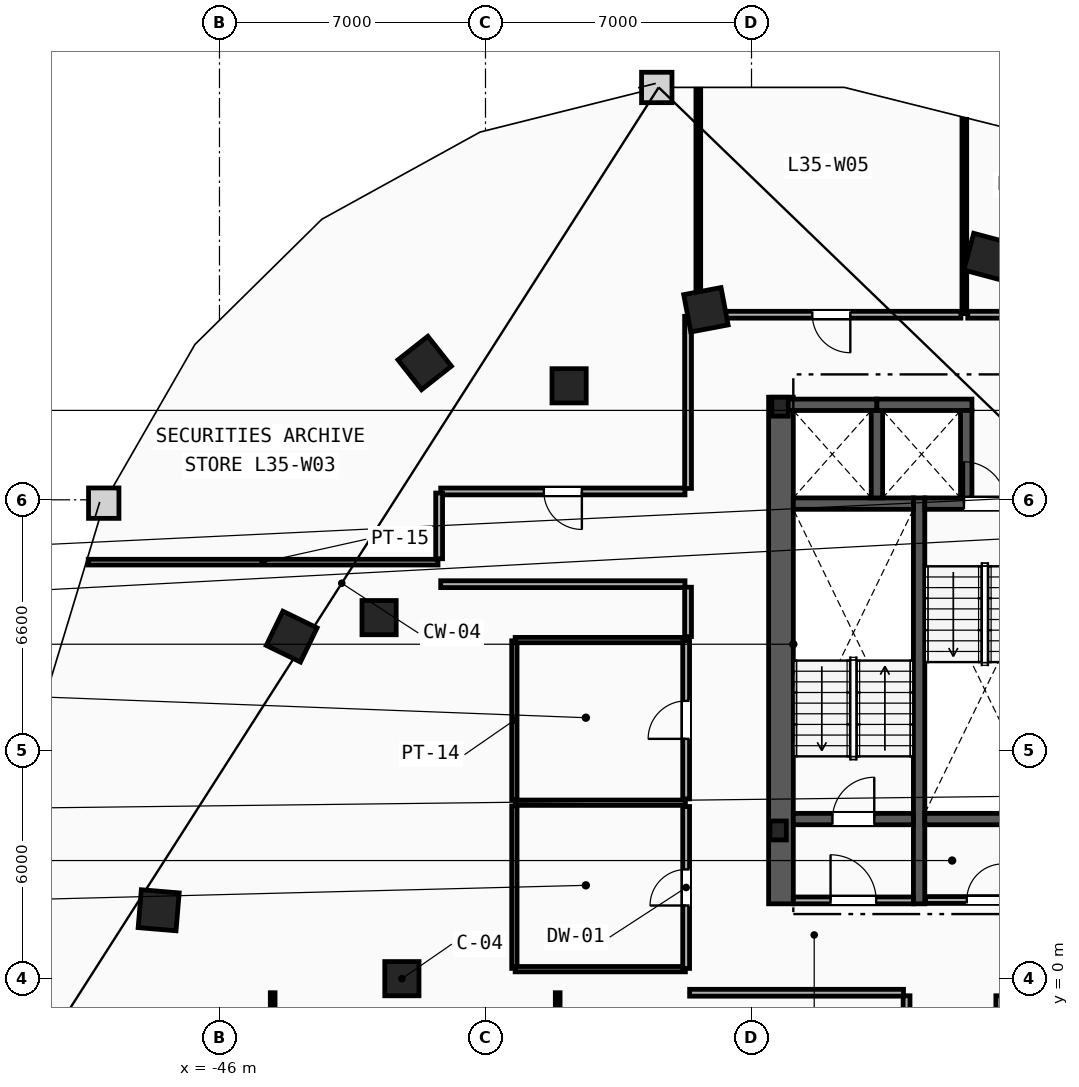
"""IFC4 building model, lengths in metres.
Left out: names, types, materials, properties, quantities, classifications, styles, units other than length and angle.
Written with IfcOpenShell. Run it as: python <this file> out.ifc"""

import sys

from ifc_helpers import new_model, si_unit, direction, frame, frame_2d, origin, origin_2d, place, context, subcontext, project, spatial, rectangle, i_section, extrude, element, fill, save


model = new_model("IFC4")
c1 = context("Model", 3, precision=1e-05, world=origin(), true_north=direction((0.0, 1.0)))
c2 = subcontext(c1, "Body", "Model", "MODEL_VIEW")
j1 = project(units=[si_unit("LENGTHUNIT", "METRE"), si_unit("PLANEANGLEUNIT", "RADIAN")], contexts=[c1])
p1 = place(None, origin())
s1 = spatial("IfcSite", under=j1, at=p1, CompositionType="ELEMENT")
p2 = place(p1, origin())
s2 = spatial("IfcBuilding", under=s1, at=p2, CompositionType="ELEMENT")
p3 = place(p2, frame((0.0, 0.0, 136.8)))
s3 = spatial("IfcBuildingStorey", under=s2, at=p3, CompositionType="ELEMENT", Elevation=136.8)
for number, where, z_axis, x_axis in (
    (1, (-31.3, 3.9, 0.0), (0.0, 0.0, 1.0), (1.0, 0.0, 0.0)),
    (2, (-31.25, 15.05, 0.0), (0.0, 0.0, 1.0), (1.0, 0.0, 0.0)),
):
    element("IfcColumn", number, at=place(p3, frame(where, z_axis=z_axis, x_axis=x_axis)), inside=s3, PredefinedType="COLUMN", context=c2, shape_type="SweptSolid", body=[
        extrude(i_section(OverallWidth=0.432, OverallDepth=0.498, WebThickness=0.056, FlangeThickness=0.089, FilletRadius=0.018, at=origin_2d()), origin(), (0.0, 0.0, 1.0), 3.6),
    ])
for number, where, z_axis, x_axis in (
    (3, (-41.2, 0.0, 0.0), (0.0, 0.0, 1.0), (1.0, 0.0, 0.0)),
    (4, (-41.8, 9.5, 0.0), (0.0, 0.0, 1.0), (1.0, 0.0, 0.0)),
    (5, (-36.8, 15.6, 0.0), (0.0, 0.0, 1.0), (1.0, 0.0, 0.0)),
):
    element("IfcColumn", number, at=place(p3, frame(where, z_axis=z_axis, x_axis=x_axis)), inside=s3, PredefinedType="COLUMN", context=c2, shape_type="SweptSolid", body=[
        extrude(rectangle(XDim=0.9, YDim=0.9, at=origin_2d()), origin(), (0.0, 0.0, 1.0), 3.6),
    ])
for number, where, z_axis, x_axis in (
    (6, (-25.8, 19.0, 0.0), (0.0, 0.0, 1.0), (-0.966, 0.259, 0.0)),
    (7, (-33.2, 17.6, 0.0), (0.0, 0.0, 1.0), (-0.983, -0.186, 0.0)),
    (8, (-40.6, 16.2, 0.0), (0.0, 0.0, 1.0), (-0.785, -0.619, 0.0)),
    (9, (-44.1, 9.0, 0.0), (0.0, 0.0, 1.0), (-0.437, -0.899, 0.0)),
    (10, (-47.6, 1.8, 0.0), (0.0, 0.0, 1.0), (-0.084, -0.997, 0.0)),
):
    element("IfcColumn", number, at=place(p3, frame(where, z_axis=z_axis, x_axis=x_axis)), inside=s3, PredefinedType="COLUMN", context=c2, shape_type="SweptSolid", body=[
        extrude(rectangle(XDim=1.0, YDim=1.0, at=origin_2d()), origin(), (0.0, 0.0, 1.0), 3.6),
    ])
p4 = place(p3, frame((-31.225, 1.97, 0.0), z_axis=(0.0, 0.0, 1.0), x_axis=(0.0, 1.0, 0.0)))
e11 = element("IfcWall", 11, at=p4, inside=s3, PredefinedType="SHEAR", context=c2, shape_type="SweptSolid", body=[
    extrude(rectangle(XDim=13.33, YDim=0.65, at=frame_2d((6.665, 0.0))), origin(), (0.0, 0.0, 1.0), 3.36),
])
p5 = place(p3, frame((-27.59, 1.97, 0.0), z_axis=(0.0, 0.0, 1.0), x_axis=(0.0, 1.0, 0.0)))
e12 = element("IfcWall", 12, at=p5, inside=s3, PredefinedType="SHEAR", context=c2, shape_type="SweptSolid", body=[
    extrude(rectangle(XDim=10.68, YDim=0.3, at=frame_2d((5.34, 0.0))), origin(), (0.0, 0.0, 1.0), 3.36),
])
p6 = place(p3, frame((-30.9, 4.2, 0.0), z_axis=(0.0, 0.0, 1.0), x_axis=(1.0, 0.0, 0.0)))
e13 = element("IfcWall", 13, at=p6, inside=s3, PredefinedType="SHEAR", context=c2, shape_type="SweptSolid", body=[
    extrude(rectangle(XDim=3.16, YDim=0.3, at=frame_2d((1.58, 0.0))), origin(), (0.0, 0.0, 1.0), 3.36),
])
p7 = place(p6, frame((1.03, 0.0, 0.0)))
e14 = element("IfcOpeningElement", 14, at=p7, cuts=e13, PredefinedType="OPENING", context=c2, shape_type="SweptSolid", body=[
    extrude(rectangle(XDim=1.1, YDim=2.15, at=frame_2d((0.55, 1.075))), frame((0.0, 0.16, 0.0), z_axis=(0.0, -1.0, 0.0), x_axis=(1.0, 0.0, 0.0)), (0.0, 0.0, 1.0), 0.32),
])
p8 = place(p3, frame((-30.9, 12.5, 0.0), z_axis=(0.0, 0.0, 1.0), x_axis=(1.0, 0.0, 0.0)))
e15 = element("IfcWall", 15, at=p8, inside=s3, PredefinedType="SHEAR", context=c2, shape_type="SweptSolid", body=[
    extrude(rectangle(XDim=3.16, YDim=0.3, at=frame_2d((1.58, 0.0))), origin(), (0.0, 0.0, 1.0), 3.36),
])
p9 = place(p3, frame((-27.44, 12.5, 0.0), z_axis=(0.0, 0.0, 1.0), x_axis=(1.0, 0.0, 0.0)))
e16 = element("IfcWall", 16, at=p9, inside=s3, PredefinedType="SHEAR", context=c2, shape_type="SweptSolid", body=[
    extrude(rectangle(XDim=3.16, YDim=0.3, at=frame_2d((1.58, 0.0))), origin(), (0.0, 0.0, 1.0), 3.36),
])
p10 = place(p9, frame((1.03, 0.0, 0.0)))
e17 = element("IfcOpeningElement", 17, at=p10, cuts=e16, PredefinedType="OPENING", context=c2, shape_type="SweptSolid", body=[
    extrude(rectangle(XDim=1.1, YDim=2.15, at=frame_2d((0.55, 1.075))), frame((0.0, 0.16, 0.0), z_axis=(0.0, -1.0, 0.0), x_axis=(1.0, 0.0, 0.0)), (0.0, 0.0, 1.0), 0.32),
])
p11 = place(p3, frame((-27.44, 4.2, 0.0), z_axis=(0.0, 0.0, 1.0), x_axis=(1.0, 0.0, 0.0)))
e18 = element("IfcWall", 18, at=p11, inside=s3, PredefinedType="SHEAR", context=c2, shape_type="SweptSolid", body=[
    extrude(rectangle(XDim=3.16, YDim=0.3, at=frame_2d((1.58, 0.0))), origin(), (0.0, 0.0, 1.0), 3.36),
])
p12 = place(p3, frame((-30.9, 2.06, 0.0), z_axis=(0.0, 0.0, 1.0), x_axis=(1.0, 0.0, 0.0)))
e19 = element("IfcWall", 19, at=p12, inside=s3, PredefinedType="PARTITIONING", context=c2, shape_type="SweptSolid", body=[
    extrude(rectangle(XDim=3.16, YDim=0.18, at=frame_2d((1.58, 0.0))), origin(), (0.0, 0.0, 1.0), 3.36),
])
p13 = place(p12, frame((0.98, 0.0, 0.0)))
e20 = element("IfcOpeningElement", 20, at=p13, cuts=e19, PredefinedType="OPENING", context=c2, shape_type="SweptSolid", body=[
    extrude(rectangle(XDim=1.2, YDim=2.15, at=frame_2d((0.6, 1.075))), frame((0.0, 0.1, 0.0), z_axis=(0.0, -1.0, 0.0), x_axis=(1.0, 0.0, 0.0)), (0.0, 0.0, 1.0), 0.2),
])
p14 = place(p3, frame((-31.2, 15.1, 0.0), z_axis=(0.0, 0.0, 1.0), x_axis=(1.0, 0.0, 0.0)))
e21 = element("IfcWall", 21, at=p14, inside=s3, PredefinedType="SHEAR", context=c2, shape_type="SweptSolid", body=[
    extrude(rectangle(XDim=2.5, YDim=0.3, at=frame_2d((1.25, 0.0))), origin(), (0.0, 0.0, 1.0), 3.36),
])
p15 = place(p3, frame((-28.7, 12.65, 0.0), z_axis=(0.0, 0.0, 1.0), x_axis=(0.0, 1.0, 0.0)))
e22 = element("IfcWall", 22, at=p15, inside=s3, PredefinedType="SHEAR", context=c2, shape_type="SweptSolid", body=[
    extrude(rectangle(XDim=2.3, YDim=0.3, at=frame_2d((1.15, 0.0))), origin(), (0.0, 0.0, 1.0), 3.36),
])
p16 = place(p3, frame((-28.7, 15.1, 0.0), z_axis=(0.0, 0.0, 1.0), x_axis=(1.0, 0.0, 0.0)))
e23 = element("IfcWall", 23, at=p16, inside=s3, PredefinedType="SHEAR", context=c2, shape_type="SweptSolid", body=[
    extrude(rectangle(XDim=2.5, YDim=0.3, at=frame_2d((1.25, 0.0))), origin(), (0.0, 0.0, 1.0), 3.36),
])
p17 = place(p3, frame((-26.35, 12.65, 0.0), z_axis=(0.0, 0.0, 1.0), x_axis=(0.0, 1.0, 0.0)))
e24 = element("IfcWall", 24, at=p17, inside=s3, PredefinedType="SHEAR", context=c2, shape_type="SweptSolid", body=[
    extrude(rectangle(XDim=2.3, YDim=0.3, at=frame_2d((1.15, 0.0))), origin(), (0.0, 0.0, 1.0), 3.36),
])
p18 = place(p3, frame((-27.42, 2.07, 0.0), z_axis=(0.0, 0.0, 1.0), x_axis=(1.0, 0.0, 0.0)))
e25 = element("IfcWall", 25, at=p18, inside=s3, PredefinedType="PARTITIONING", context=c2, shape_type="SweptSolid", body=[
    extrude(rectangle(XDim=3.12, YDim=0.18, at=frame_2d((1.56, 0.0))), origin(), (0.0, 0.0, 1.0), 3.36),
])
p19 = place(p18, frame((1.085, 0.0, 0.0)))
e26 = element("IfcOpeningElement", 26, at=p19, cuts=e25, PredefinedType="OPENING", context=c2, shape_type="SweptSolid", body=[
    extrude(rectangle(XDim=0.95, YDim=2.1, at=frame_2d((0.475, 1.05))), frame((0.0, 0.1, 0.0), z_axis=(0.0, -1.0, 0.0), x_axis=(1.0, 0.0, 0.0)), (0.0, 0.0, 1.0), 0.2),
])
p20 = place(p3, frame((-38.24, 0.27, 0.0), z_axis=(0.0, 0.0, 1.0), x_axis=(0.0, 1.0, 0.0)))
e27 = element("IfcWall", 27, at=p20, inside=s3, PredefinedType="PARTITIONING", context=c2, shape_type="SweptSolid", body=[
    extrude(rectangle(XDim=4.275, YDim=0.14, at=frame_2d((2.137, 0.0))), origin(), (0.0, 0.0, 1.0), 3.36),
])
p21 = place(p3, frame((-38.24, 4.715, 0.0), z_axis=(0.0, 0.0, 1.0), x_axis=(0.0, 1.0, 0.0)))
e28 = element("IfcWall", 28, at=p21, inside=s3, PredefinedType="PARTITIONING", context=c2, shape_type="SweptSolid", body=[
    extrude(rectangle(XDim=4.175, YDim=0.14, at=frame_2d((2.087, 0.0))), origin(), (0.0, 0.0, 1.0), 3.36),
])
for number, where, z_axis, x_axis in (
    (29, (-38.22, 0.25, 0.0), (0.0, 0.0, 1.0), (1.0, 0.0, 0.0)),
    (30, (-38.22, 4.63, 0.0), (0.0, 0.0, 1.0), (1.0, 0.0, 0.0)),
    (31, (-38.22, 8.91, 0.0), (0.0, 0.0, 1.0), (1.0, 0.0, 0.0)),
):
    element("IfcWall", number, at=place(p3, frame(where, z_axis=z_axis, x_axis=x_axis)), inside=s3, PredefinedType="PARTITIONING", context=c2, shape_type="SweptSolid", body=[
        extrude(rectangle(XDim=4.48, YDim=0.14, at=frame_2d((2.24, 0.0))), origin(), (0.0, 0.0, 1.0), 3.36),
    ])
p22 = place(p3, frame((-33.72, 0.27, 0.0), z_axis=(0.0, 0.0, 1.0), x_axis=(0.0, 1.0, 0.0)))
e32 = element("IfcWall", 32, at=p22, inside=s3, PredefinedType="PARTITIONING", context=c2, shape_type="SweptSolid", body=[
    extrude(rectangle(XDim=4.26, YDim=0.18, at=frame_2d((2.13, 0.0))), origin(), (0.0, 0.0, 1.0), 3.36),
])
p23 = place(p22, frame((1.655, 0.0, 0.0)))
e33 = element("IfcOpeningElement", 33, at=p23, cuts=e32, PredefinedType="OPENING", context=c2, shape_type="SweptSolid", body=[
    extrude(rectangle(XDim=0.95, YDim=2.1, at=frame_2d((0.475, 1.05))), frame((0.0, 0.1, 0.0), z_axis=(0.0, -1.0, 0.0), x_axis=(1.0, 0.0, 0.0)), (0.0, 0.0, 1.0), 0.2),
])
p24 = place(p3, frame((-33.72, 4.73, 0.0), z_axis=(0.0, 0.0, 1.0), x_axis=(0.0, 1.0, 0.0)))
e34 = element("IfcWall", 34, at=p24, inside=s3, PredefinedType="PARTITIONING", context=c2, shape_type="SweptSolid", body=[
    extrude(rectangle(XDim=4.16, YDim=0.18, at=frame_2d((2.08, 0.0))), origin(), (0.0, 0.0, 1.0), 3.36),
])
p25 = place(p24, frame((1.58, 0.0, 0.0)))
e35 = element("IfcOpeningElement", 35, at=p25, cuts=e34, PredefinedType="OPENING", context=c2, shape_type="SweptSolid", body=[
    extrude(rectangle(XDim=1.0, YDim=2.15, at=frame_2d((0.5, 1.075))), frame((0.0, 0.1, 0.0), z_axis=(0.0, -1.0, 0.0), x_axis=(1.0, 0.0, 0.0)), (0.0, 0.0, 1.0), 0.2),
])
p26 = place(p3, frame((-44.6, -18.644, 0.0), z_axis=(0.0, 0.0, 1.0), x_axis=(0.0, 1.0, 0.0)))
e36 = element("IfcWall", 36, at=p26, inside=s3, PredefinedType="PARTITIONING", context=c2, shape_type="SweptSolid", body=[
    extrude(rectangle(XDim=18.274, YDim=0.125, at=frame_2d((9.137, 0.0))), origin(), (0.0, 0.0, 1.0), 2.665),
])
p27 = place(p3, frame((-37.1, -22.736, 0.0), z_axis=(0.0, 0.0, 1.0), x_axis=(0.0, 1.0, 0.0)))
e37 = element("IfcWall", 37, at=p27, inside=s3, PredefinedType="PARTITIONING", context=c2, shape_type="SweptSolid", body=[
    extrude(rectangle(XDim=22.366, YDim=0.125, at=frame_2d((11.183, 0.0))), origin(), (0.0, 0.0, 1.0), 3.36),
])
p28 = place(p3, frame((-49.454, 10.96, 0.0), z_axis=(0.0, 0.0, 1.0), x_axis=(1.0, 0.0, 0.0)))
e38 = element("IfcWall", 38, at=p28, inside=s3, PredefinedType="PARTITIONING", context=c2, shape_type="SweptSolid", body=[
    extrude(rectangle(XDim=9.204, YDim=0.15, at=frame_2d((4.602, 0.0))), origin(), (0.0, 0.0, 1.0), 3.36),
])
p29 = place(p3, frame((-33.4, 17.5, 0.0), z_axis=(0.0, 0.0, 1.0), x_axis=(0.0, 1.0, 0.0)))
e39 = element("IfcWall", 39, at=p29, inside=s3, PredefinedType="PARTITIONING", context=c2, shape_type="SweptSolid", body=[
    extrude(rectangle(XDim=5.902, YDim=0.125, at=frame_2d((2.951, 0.0))), origin(), (0.0, 0.0, 1.0), 3.36),
])
p30 = place(p3, frame((-26.4, 17.5, 0.0), z_axis=(0.0, 0.0, 1.0), x_axis=(0.0, 1.0, 0.0)))
e40 = element("IfcWall", 40, at=p30, inside=s3, PredefinedType="PARTITIONING", context=c2, shape_type="SweptSolid", body=[
    extrude(rectangle(XDim=5.111, YDim=0.125, at=frame_2d((2.556, 0.0))), origin(), (0.0, 0.0, 1.0), 3.36),
])
p31 = place(p3, frame((-27.92, -0.45, 0.0), z_axis=(0.0, 0.0, 1.0), x_axis=(0.0, -1.0, 0.0)))
e41 = element("IfcWall", 41, at=p31, inside=s3, PredefinedType="PARTITIONING", context=c2, shape_type="SweptSolid", body=[
    extrude(rectangle(XDim=10.729, YDim=0.18, at=frame_2d((5.364, 0.0))), origin(), (0.0, 0.0, 1.0), 3.36),
])
p32 = place(p31, frame((4.864, 0.0, 0.0)))
e42 = element("IfcOpeningElement", 42, at=p32, cuts=e41, PredefinedType="OPENING", context=c2, shape_type="SweptSolid", body=[
    extrude(rectangle(XDim=1.0, YDim=2.15, at=frame_2d((0.5, 1.075))), frame((0.0, 0.1, 0.0), z_axis=(0.0, -1.0, 0.0), x_axis=(1.0, 0.0, 0.0)), (0.0, 0.0, 1.0), 0.2),
])
p33 = place(p3, frame((-25.48, -11.178, 0.0), z_axis=(0.0, 0.0, 1.0), x_axis=(0.0, 1.0, 0.0)))
e43 = element("IfcWall", 43, at=p33, inside=s3, PredefinedType="PARTITIONING", context=c2, shape_type="SweptSolid", body=[
    extrude(rectangle(XDim=10.729, YDim=0.18, at=frame_2d((5.364, 0.0))), origin(), (0.0, 0.0, 1.0), 3.36),
])
p34 = place(p3, frame((-40.178, 10.38, 0.0), z_axis=(0.0, 0.0, 1.0), x_axis=(1.0, 0.0, 0.0)))
e44 = element("IfcWall", 44, at=p34, inside=s3, PredefinedType="PARTITIONING", context=c2, shape_type="SweptSolid", body=[
    extrude(rectangle(XDim=6.428, YDim=0.18, at=frame_2d((3.214, 0.0))), origin(), (0.0, 0.0, 1.0), 3.36),
])
p35 = place(p3, frame((-33.628, -0.37, 0.0), z_axis=(0.0, 0.0, 1.0), x_axis=(1.0, 0.0, 0.0)))
e45 = element("IfcWall", 45, at=p35, inside=s3, PredefinedType="PARTITIONING", context=c2, shape_type="SweptSolid", body=[
    extrude(rectangle(XDim=5.628, YDim=0.18, at=frame_2d((2.814, 0.0))), origin(), (0.0, 0.0, 1.0), 3.36),
])
p36 = place(p3, frame((-33.67, 10.3, 0.0), z_axis=(0.0, 0.0, 1.0), x_axis=(0.0, -1.0, 0.0)))
e46 = element("IfcWall", 46, at=p36, inside=s3, PredefinedType="PARTITIONING", context=c2, shape_type="SweptSolid", body=[
    extrude(rectangle(XDim=1.299, YDim=0.18, at=frame_2d((0.649, 0.0))), origin(), (0.0, 0.0, 1.0), 3.36),
])
p37 = place(p3, frame((-33.75, 12.82, 0.0), z_axis=(0.0, 0.0, 1.0), x_axis=(-1.0, 0.0, 0.0)))
e47 = element("IfcWall", 47, at=p37, inside=s3, PredefinedType="PARTITIONING", context=c2, shape_type="SweptSolid", body=[
    extrude(rectangle(XDim=6.428, YDim=0.18, at=frame_2d((3.214, 0.0))), origin(), (0.0, 0.0, 1.0), 3.36),
])
p38 = place(p37, frame((2.714, 0.0, 0.0)))
e48 = element("IfcOpeningElement", 48, at=p38, cuts=e47, PredefinedType="OPENING", context=c2, shape_type="SweptSolid", body=[
    extrude(rectangle(XDim=1.0, YDim=2.15, at=frame_2d((0.5, 1.075))), frame((0.0, 0.1, 0.0), z_axis=(0.0, -1.0, 0.0), x_axis=(1.0, 0.0, 0.0)), (0.0, 0.0, 1.0), 0.2),
])
p39 = place(p3, frame((-33.67, 17.428, 0.0), z_axis=(0.0, 0.0, 1.0), x_axis=(0.0, -1.0, 0.0)))
e49 = element("IfcWall", 49, at=p39, inside=s3, PredefinedType="PARTITIONING", context=c2, shape_type="SweptSolid", body=[
    extrude(rectangle(XDim=4.529, YDim=0.18, at=frame_2d((2.264, 0.0))), origin(), (0.0, 0.0, 1.0), 3.36),
])
p40 = place(p3, frame((-40.22, 12.779, 0.0), z_axis=(0.0, 0.0, 1.0), x_axis=(0.0, -1.0, 0.0)))
e50 = element("IfcWall", 50, at=p40, inside=s3, PredefinedType="PARTITIONING", context=c2, shape_type="SweptSolid", body=[
    extrude(rectangle(XDim=1.729, YDim=0.18, at=frame_2d((0.864, 0.0))), origin(), (0.0, 0.0, 1.0), 3.36),
])
p41 = place(p3, frame((-18.342, 17.47, 0.0), z_axis=(0.0, 0.0, 1.0), x_axis=(-1.0, 0.0, 0.0)))
e51 = element("IfcWall", 51, at=p41, inside=s3, PredefinedType="PARTITIONING", context=c2, shape_type="SweptSolid", body=[
    extrude(rectangle(XDim=7.968, YDim=0.18, at=frame_2d((3.984, 0.0))), origin(), (0.0, 0.0, 1.0), 3.36),
])
p42 = place(p41, frame((3.484, 0.0, 0.0)))
e52 = element("IfcOpeningElement", 52, at=p42, cuts=e51, PredefinedType="OPENING", context=c2, shape_type="SweptSolid", body=[
    extrude(rectangle(XDim=1.0, YDim=2.15, at=frame_2d((0.5, 1.075))), frame((0.0, 0.1, 0.0), z_axis=(0.0, -1.0, 0.0), x_axis=(1.0, 0.0, 0.0)), (0.0, 0.0, 1.0), 0.2),
])
p43 = place(p3, frame((-26.49, 17.47, 0.0), z_axis=(0.0, 0.0, 1.0), x_axis=(-1.0, 0.0, 0.0)))
e53 = element("IfcWall", 53, at=p43, inside=s3, PredefinedType="PARTITIONING", context=c2, shape_type="SweptSolid", body=[
    extrude(rectangle(XDim=6.82, YDim=0.18, at=frame_2d((3.41, 0.0))), origin(), (0.0, 0.0, 1.0), 3.36),
])
p44 = place(p43, frame((2.91, 0.0, 0.0)))
e54 = element("IfcOpeningElement", 54, at=p44, cuts=e53, PredefinedType="OPENING", context=c2, shape_type="SweptSolid", body=[
    extrude(rectangle(XDim=1.0, YDim=2.15, at=frame_2d((0.5, 1.075))), frame((0.0, 0.1, 0.0), z_axis=(0.0, -1.0, 0.0), x_axis=(1.0, 0.0, 0.0)), (0.0, 0.0, 1.0), 0.2),
])
p45 = place(p7, origin())
e55 = element("IfcDoor", 55, at=p45, inside=s3, OperationType="SINGLE_SWING_RIGHT", PredefinedType="DOOR", context=c2, shape_type="SweptSolid", body=[
    extrude(rectangle(XDim=1.1, YDim=2.15, at=frame_2d((0.55, 1.075))), frame((0.0, 0.025, 0.0), z_axis=(0.0, -1.0, 0.0), x_axis=(1.0, 0.0, 0.0)), (0.0, 0.0, 1.0), 0.05),
])
fill(e14, e55)
p46 = place(p10, origin())
e56 = element("IfcDoor", 56, at=p46, inside=s3, OperationType="SINGLE_SWING_LEFT", PredefinedType="DOOR", context=c2, shape_type="SweptSolid", body=[
    extrude(rectangle(XDim=1.1, YDim=2.15, at=frame_2d((0.55, 1.075))), frame((0.0, 0.025, 0.0), z_axis=(0.0, -1.0, 0.0), x_axis=(1.0, 0.0, 0.0)), (0.0, 0.0, 1.0), 0.05),
])
fill(e17, e56)
p47 = place(p13, origin())
e57 = element("IfcDoor", 57, at=p47, inside=s3, OperationType="SINGLE_SWING_LEFT", PredefinedType="DOOR", context=c2, shape_type="SweptSolid", body=[
    extrude(rectangle(XDim=1.2, YDim=2.15, at=frame_2d((0.6, 1.075))), frame((0.0, 0.025, 0.0), z_axis=(0.0, -1.0, 0.0), x_axis=(1.0, 0.0, 0.0)), (0.0, 0.0, 1.0), 0.05),
])
fill(e20, e57)
p48 = place(p44, origin())
e58 = element("IfcDoor", 58, at=p48, inside=s3, OperationType="SINGLE_SWING_LEFT", PredefinedType="DOOR", context=c2, shape_type="SweptSolid", body=[
    extrude(rectangle(XDim=1.0, YDim=2.15, at=frame_2d((0.5, 1.075))), frame((0.0, 0.025, 0.0), z_axis=(0.0, -1.0, 0.0), x_axis=(1.0, 0.0, 0.0)), (0.0, 0.0, 1.0), 0.05),
])
fill(e54, e58)
p49 = place(p38, origin())
e59 = element("IfcDoor", 59, at=p49, inside=s3, OperationType="SINGLE_SWING_LEFT", PredefinedType="DOOR", context=c2, shape_type="SweptSolid", body=[
    extrude(rectangle(XDim=1.0, YDim=2.15, at=frame_2d((0.5, 1.075))), frame((0.0, 0.025, 0.0), z_axis=(0.0, -1.0, 0.0), x_axis=(1.0, 0.0, 0.0)), (0.0, 0.0, 1.0), 0.05),
])
fill(e48, e59)
p50 = place(p23, origin())
e60 = element("IfcDoor", 60, at=p50, inside=s3, OperationType="SINGLE_SWING_LEFT", PredefinedType="DOOR", context=c2, shape_type="SweptSolid", body=[
    extrude(rectangle(XDim=0.95, YDim=2.1, at=frame_2d((0.475, 1.05))), frame((0.0, 0.025, 0.0), z_axis=(0.0, -1.0, 0.0), x_axis=(1.0, 0.0, 0.0)), (0.0, 0.0, 1.0), 0.05),
])
fill(e33, e60)
p51 = place(p25, origin())
e61 = element("IfcDoor", 61, at=p51, inside=s3, OperationType="SINGLE_SWING_LEFT", PredefinedType="DOOR", context=c2, shape_type="SweptSolid", body=[
    extrude(rectangle(XDim=1.0, YDim=2.15, at=frame_2d((0.5, 1.075))), frame((0.0, 0.025, 0.0), z_axis=(0.0, -1.0, 0.0), x_axis=(1.0, 0.0, 0.0)), (0.0, 0.0, 1.0), 0.05),
])
fill(e35, e61)
p52 = place(p19, origin())
e62 = element("IfcDoor", 62, at=p52, inside=s3, OperationType="SINGLE_SWING_RIGHT", PredefinedType="DOOR", context=c2, shape_type="SweptSolid", body=[
    extrude(rectangle(XDim=0.95, YDim=2.1, at=frame_2d((0.475, 1.05))), frame((0.0, 0.025, 0.0), z_axis=(0.0, -1.0, 0.0), x_axis=(1.0, 0.0, 0.0)), (0.0, 0.0, 1.0), 0.05),
])
fill(e26, e62)
save(model, sys.argv[1])
